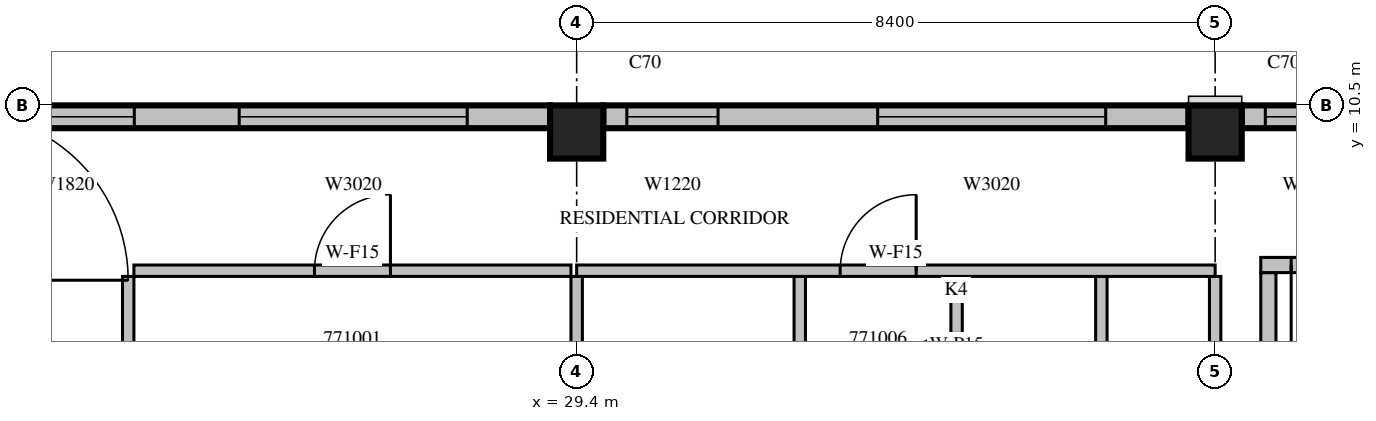
"""IFC4 building model, lengths in metres.
Left out: names, types, materials, properties, quantities, classifications, styles, units other than length and angle.
Written with IfcOpenShell. Run it as: python <this file> out.ifc"""

import sys

from ifc_helpers import new_model, si_unit, direction, frame, frame_2d, origin, origin_2d, place, context, subcontext, project, spatial, rectangle, extrude, source, transform, mapped, element, fill, save


model = new_model("IFC4")
c1 = context("Model", 3, precision=1e-05, world=origin(), true_north=direction((0.0, 1.0)))
c2 = subcontext(c1, "Body", "Model", "MODEL_VIEW")
j1 = project(units=[si_unit("LENGTHUNIT", "METRE"), si_unit("PLANEANGLEUNIT", "RADIAN")], contexts=[c1])
p1 = place(None, origin())
s1 = spatial("IfcSite", under=j1, at=p1, CompositionType="ELEMENT")
p2 = place(p1, origin())
s2 = spatial("IfcBuilding", under=s1, at=p2, CompositionType="ELEMENT")
p3 = place(p2, frame((0.0, 0.0, 309.0)))
s3 = spatial("IfcBuildingStorey", under=s2, at=p3, CompositionType="ELEMENT", Elevation=309.0)
m1 = source(origin(), c2, "Body", "SweptSolid", [
    extrude(rectangle(XDim=0.7, YDim=0.7, at=origin_2d()), origin(), (0.0, 0.0, 1.0), 3.5),
])
for number, where, z_axis, x_axis in (
    (1, (29.4, 10.15, 0.0), (0.0, 0.0, 1.0), (1.0, 0.0, 0.0)),
    (2, (37.8, 10.15, 0.0), (0.0, 0.0, 1.0), (1.0, 0.0, 0.0)),
):
    element("IfcColumn", number, at=place(p3, frame(where, z_axis=z_axis, x_axis=x_axis)), inside=s3, PredefinedType="COLUMN", context=c2, shape_type="MappedRepresentation", body=[
        mapped(m1, transform((0.0, 0.0, 0.0), scale=1.0)),
    ])
m2 = source(origin(), c2, "Body", "SweptSolid", [
    extrude(rectangle(XDim=7.7, YDim=0.3, at=frame_2d((3.85, 0.0))), origin(), (0.0, 0.0, 1.0), 3.1),
])
p4 = place(p3, frame((45.85, 10.35, 0.0), z_axis=(0.0, 0.0, 1.0), x_axis=(-1.0, 0.0, 0.0)))
e3 = element("IfcWall", 3, at=p4, inside=s3, PredefinedType="STANDARD", context=c2, shape_type="MappedRepresentation", body=[
    mapped(m2, transform((0.0, 0.0, 0.0), scale=1.0)),
])
m3 = source(origin(), c2, "Body", "SweptSolid", [
    extrude(rectangle(XDim=3.0, YDim=2.0, at=frame_2d((1.5, 1.0))), frame((0.0, 0.16, 0.0), z_axis=(0.0, -1.0, 0.0), x_axis=(1.0, 0.0, 0.0)), (0.0, 0.0, 1.0), 0.32),
])
p5 = place(p4, frame((1.09, 0.0, 0.6)))
e4 = element("IfcOpeningElement", 4, at=p5, cuts=e3, PredefinedType="OPENING", context=c2, shape_type="MappedRepresentation", body=[
    mapped(m3, transform((0.0, 0.0, 0.0), scale=1.0)),
])
m4 = source(origin(), c2, "Body", "SweptSolid", [
    extrude(rectangle(XDim=1.2, YDim=2.0, at=frame_2d((0.6, 1.0))), frame((0.0, 0.16, 0.0), z_axis=(0.0, -1.0, 0.0), x_axis=(1.0, 0.0, 0.0)), (0.0, 0.0, 1.0), 0.32),
])
p6 = place(p4, frame((6.19, 0.0, 0.6)))
e5 = element("IfcOpeningElement", 5, at=p6, cuts=e3, PredefinedType="OPENING", context=c2, shape_type="MappedRepresentation", body=[
    mapped(m4, transform((0.0, 0.0, 0.0), scale=1.0)),
])
p7 = place(p3, frame((37.45, 10.35, 0.0), z_axis=(0.0, 0.0, 1.0), x_axis=(-1.0, 0.0, 0.0)))
e6 = element("IfcWall", 6, at=p7, inside=s3, PredefinedType="STANDARD", context=c2, shape_type="MappedRepresentation", body=[
    mapped(m2, transform((0.0, 0.0, 0.0), scale=1.0)),
])
p8 = place(p7, frame((1.09, 0.0, 0.6)))
e7 = element("IfcOpeningElement", 7, at=p8, cuts=e6, PredefinedType="OPENING", context=c2, shape_type="MappedRepresentation", body=[
    mapped(m3, transform((0.0, 0.0, 0.0), scale=1.0)),
])
p9 = place(p7, frame((6.19, 0.0, 0.6)))
e8 = element("IfcOpeningElement", 8, at=p9, cuts=e6, PredefinedType="OPENING", context=c2, shape_type="MappedRepresentation", body=[
    mapped(m4, transform((0.0, 0.0, 0.0), scale=1.0)),
])
m5 = source(origin(), c2, "Body", "SweptSolid", [
    extrude(rectangle(XDim=7.45, YDim=0.3, at=frame_2d((3.725, 0.0))), origin(), (0.0, 0.0, 1.0), 3.1),
])
p10 = place(p3, frame((29.05, 10.35, 0.0), z_axis=(0.0, 0.0, 1.0), x_axis=(-1.0, 0.0, 0.0)))
e9 = element("IfcWall", 9, at=p10, inside=s3, PredefinedType="STANDARD", context=c2, shape_type="MappedRepresentation", body=[
    mapped(m5, transform((0.0, 0.0, 0.0), scale=1.0)),
])
p11 = place(p10, frame((1.09, 0.0, 0.6)))
e10 = element("IfcOpeningElement", 10, at=p11, cuts=e9, PredefinedType="OPENING", context=c2, shape_type="MappedRepresentation", body=[
    mapped(m3, transform((0.0, 0.0, 0.0), scale=1.0)),
])
m6 = source(origin(), c2, "Body", "SweptSolid", [
    extrude(rectangle(XDim=1.8, YDim=2.0, at=frame_2d((0.9, 1.0))), frame((0.0, 0.16, 0.0), z_axis=(0.0, -1.0, 0.0), x_axis=(1.0, 0.0, 0.0)), (0.0, 0.0, 1.0), 0.32),
])
p12 = place(p10, frame((5.47, 0.0, 0.6)))
e11 = element("IfcOpeningElement", 11, at=p12, cuts=e9, PredefinedType="OPENING", context=c2, shape_type="MappedRepresentation", body=[
    mapped(m6, transform((0.0, 0.0, 0.0), scale=1.0)),
])
m7 = source(origin(), c2, "Body", "SweptSolid", [
    extrude(rectangle(XDim=8.0, YDim=0.2, at=frame_2d((4.0, 0.0))), origin(), (0.0, 0.0, 1.0), 3.1),
])
p13 = place(p3, frame((38.5, 0.3, 0.0), z_axis=(0.0, 0.0, 1.0), x_axis=(0.0, 1.0, 0.0)))
e12 = element("IfcWall", 12, at=p13, inside=s3, PredefinedType="PARTITIONING", context=c2, shape_type="MappedRepresentation", body=[
    mapped(m7, transform((0.0, 0.0, 0.0), scale=1.0)),
])
m8 = source(origin(), c2, "Body", "SweptSolid", [
    extrude(rectangle(XDim=5.45, YDim=0.2, at=frame_2d((2.725, 0.0))), origin(), (0.0, 0.0, 1.0), 3.1),
])
p14 = place(p3, frame((38.4, 8.4, 0.0), z_axis=(0.0, 0.0, 1.0), x_axis=(1.0, 0.0, 0.0)))
e13 = element("IfcWall", 13, at=p14, inside=s3, PredefinedType="PARTITIONING", context=c2, shape_type="MappedRepresentation", body=[
    mapped(m8, transform((0.0, 0.0, 0.0), scale=1.0)),
])
m9 = source(origin(), c2, "Body", "SweptSolid", [
    extrude(rectangle(XDim=1.2, YDim=2.1, at=frame_2d((0.6, 1.05))), frame((0.0, 0.11, 0.0), z_axis=(0.0, -1.0, 0.0), x_axis=(1.0, 0.0, 0.0)), (0.0, 0.0, 1.0), 0.22),
])
p15 = place(p14, frame((0.4, 0.0, 0.0)))
e14 = element("IfcOpeningElement", 14, at=p15, cuts=e13, PredefinedType="OPENING", context=c2, shape_type="MappedRepresentation", body=[
    mapped(m9, transform((0.0, 0.0, 0.0), scale=1.0)),
])
m10 = source(origin(), c2, "Body", "SweptSolid", [
    extrude(rectangle(XDim=0.9, YDim=2.1, at=frame_2d((0.45, 1.05))), frame((0.0, 0.11, 0.0), z_axis=(0.0, -1.0, 0.0), x_axis=(1.0, 0.0, 0.0)), (0.0, 0.0, 1.0), 0.22),
])
p16 = place(p14, frame((3.25, 0.0, 0.0)))
e15 = element("IfcOpeningElement", 15, at=p16, cuts=e13, PredefinedType="OPENING", context=c2, shape_type="MappedRepresentation", body=[
    mapped(m10, transform((0.0, 0.0, 0.0), scale=1.0)),
])
m11 = source(origin(), c2, "Body", "SweptSolid", [
    extrude(rectangle(XDim=4.575, YDim=0.15, at=frame_2d((2.288, 0.0))), origin(), (0.0, 0.0, 1.0), 3.1),
])
p17 = place(p3, frame((23.5, 8.25, 0.0), z_axis=(0.0, 0.0, 1.0), x_axis=(0.0, -1.0, 0.0)))
e16 = element("IfcWall", 16, at=p17, inside=s3, PredefinedType="PARTITIONING", context=c2, shape_type="MappedRepresentation", body=[
    mapped(m11, transform((0.0, 0.0, 0.0), scale=1.0)),
])
m12 = source(origin(), c2, "Body", "SweptSolid", [
    extrude(rectangle(XDim=0.9, YDim=2.1, at=frame_2d((0.45, 1.05))), frame((0.0, 0.085, 0.0), z_axis=(0.0, -1.0, 0.0), x_axis=(1.0, 0.0, 0.0)), (0.0, 0.0, 1.0), 0.17),
])
p18 = place(p17, frame((2.981, 0.0, 0.0)))
e17 = element("IfcOpeningElement", 17, at=p18, cuts=e16, PredefinedType="OPENING", context=c2, shape_type="MappedRepresentation", body=[
    mapped(m12, transform((0.0, 0.0, 0.0), scale=1.0)),
])
p19 = place(p3, frame((29.4, 3.675, 0.0), z_axis=(0.0, 0.0, 1.0), x_axis=(0.0, 1.0, 0.0)))
e18 = element("IfcWall", 18, at=p19, inside=s3, PredefinedType="PARTITIONING", context=c2, shape_type="MappedRepresentation", body=[
    mapped(m11, transform((0.0, 0.0, 0.0), scale=1.0)),
])
m13 = source(origin(), c2, "Body", "SweptSolid", [
    extrude(rectangle(XDim=5.75, YDim=0.15, at=frame_2d((2.875, 0.0))), origin(), (0.0, 0.0, 1.0), 3.1),
])
p20 = place(p3, frame((29.325, 8.325, 0.0), z_axis=(0.0, 0.0, 1.0), x_axis=(-1.0, 0.0, 0.0)))
e19 = element("IfcWall", 19, at=p20, inside=s3, PredefinedType="PARTITIONING", context=c2, shape_type="MappedRepresentation", body=[
    mapped(m13, transform((0.0, 0.0, 0.0), scale=1.0)),
])
m14 = source(origin(), c2, "Body", "SweptSolid", [
    extrude(rectangle(XDim=1.0, YDim=2.1, at=frame_2d((0.5, 1.05))), frame((0.0, 0.085, 0.0), z_axis=(0.0, -1.0, 0.0), x_axis=(1.0, 0.0, 0.0)), (0.0, 0.0, 1.0), 0.17),
])
p21 = place(p20, frame((2.375, 0.0, 0.0)))
e20 = element("IfcOpeningElement", 20, at=p21, cuts=e19, PredefinedType="OPENING", context=c2, shape_type="MappedRepresentation", body=[
    mapped(m14, transform((0.0, 0.0, 0.0), scale=1.0)),
])
m15 = source(origin(), c2, "Body", "SweptSolid", [
    extrude(rectangle(XDim=2.4, YDim=0.15, at=frame_2d((1.2, 0.0))), origin(), (0.0, 0.0, 1.0), 3.1),
])
p22 = place(p3, frame((32.335, 5.85, 0.0), z_axis=(0.0, 0.0, 1.0), x_axis=(0.0, 1.0, 0.0)))
e21 = element("IfcWall", 21, at=p22, inside=s3, PredefinedType="PARTITIONING", context=c2, shape_type="MappedRepresentation", body=[
    mapped(m15, transform((0.0, 0.0, 0.0), scale=1.0)),
])
p23 = place(p3, frame((34.398, 5.85, 0.0), z_axis=(0.0, 0.0, 1.0), x_axis=(0.0, 1.0, 0.0)))
e22 = element("IfcWall", 22, at=p23, inside=s3, PredefinedType="PARTITIONING", context=c2, shape_type="MappedRepresentation", body=[
    mapped(m15, transform((0.0, 0.0, 0.0), scale=1.0)),
])
p24 = place(p23, frame((0.75, 0.0, 0.0)))
e23 = element("IfcOpeningElement", 23, at=p24, cuts=e22, PredefinedType="OPENING", context=c2, shape_type="MappedRepresentation", body=[
    mapped(m12, transform((0.0, 0.0, 0.0), scale=1.0)),
])
for number, where, z_axis, x_axis in (
    (24, (36.303, 5.85, 0.0), (0.0, 0.0, 1.0), (0.0, 1.0, 0.0)),
    (25, (37.8, 5.85, 0.0), (0.0, 0.0, 1.0), (0.0, 1.0, 0.0)),
):
    element("IfcWall", number, at=place(p3, frame(where, z_axis=z_axis, x_axis=x_axis)), inside=s3, PredefinedType="PARTITIONING", context=c2, shape_type="MappedRepresentation", body=[
        mapped(m15, transform((0.0, 0.0, 0.0), scale=1.0)),
    ])
m16 = source(origin(), c2, "Body", "SweptSolid", [
    extrude(rectangle(XDim=8.4, YDim=0.15, at=frame_2d((4.2, 0.0))), origin(), (0.0, 0.0, 1.0), 3.1),
])
p25 = place(p3, frame((37.8, 8.325, 0.0), z_axis=(0.0, 0.0, 1.0), x_axis=(-1.0, 0.0, 0.0)))
e26 = element("IfcWall", 26, at=p25, inside=s3, PredefinedType="PARTITIONING", context=c2, shape_type="MappedRepresentation", body=[
    mapped(m16, transform((0.0, 0.0, 0.0), scale=1.0)),
])
p26 = place(p25, frame((3.933, 0.0, 0.0)))
e27 = element("IfcOpeningElement", 27, at=p26, cuts=e26, PredefinedType="OPENING", context=c2, shape_type="MappedRepresentation", body=[
    mapped(m14, transform((0.0, 0.0, 0.0), scale=1.0)),
])
m17 = source(origin(), c2, "Body", "SweptSolid", [
    extrude(rectangle(XDim=1.2, YDim=2.0, at=frame_2d((0.6, 1.0))), frame((0.0, 0.03, 0.0), z_axis=(0.0, -1.0, 0.0), x_axis=(1.0, 0.0, 0.0)), (0.0, 0.0, 1.0), 0.06),
])
p27 = place(p6, origin())
e28 = element("IfcWindow", 28, at=p27, inside=s3, PartitioningType="SINGLE_PANEL", PredefinedType="WINDOW", context=c2, shape_type="MappedRepresentation", body=[
    mapped(m17, transform((0.0, 0.0, 0.0), scale=1.0)),
])
fill(e5, e28)
m18 = source(origin(), c2, "Body", "SweptSolid", [
    extrude(rectangle(XDim=3.0, YDim=2.0, at=frame_2d((1.5, 1.0))), frame((0.0, 0.03, 0.0), z_axis=(0.0, -1.0, 0.0), x_axis=(1.0, 0.0, 0.0)), (0.0, 0.0, 1.0), 0.06),
])
p28 = place(p8, origin())
e29 = element("IfcWindow", 29, at=p28, inside=s3, PartitioningType="SINGLE_PANEL", PredefinedType="WINDOW", context=c2, shape_type="MappedRepresentation", body=[
    mapped(m18, transform((0.0, 0.0, 0.0), scale=1.0)),
])
fill(e7, e29)
p29 = place(p9, origin())
e30 = element("IfcWindow", 30, at=p29, inside=s3, PartitioningType="SINGLE_PANEL", PredefinedType="WINDOW", context=c2, shape_type="MappedRepresentation", body=[
    mapped(m17, transform((0.0, 0.0, 0.0), scale=1.0)),
])
fill(e8, e30)
p30 = place(p11, origin())
e31 = element("IfcWindow", 31, at=p30, inside=s3, PartitioningType="SINGLE_PANEL", PredefinedType="WINDOW", context=c2, shape_type="MappedRepresentation", body=[
    mapped(m18, transform((0.0, 0.0, 0.0), scale=1.0)),
])
fill(e10, e31)
m19 = source(origin(), c2, "Body", "SweptSolid", [
    extrude(rectangle(XDim=1.8, YDim=2.0, at=frame_2d((0.9, 1.0))), frame((0.0, 0.03, 0.0), z_axis=(0.0, -1.0, 0.0), x_axis=(1.0, 0.0, 0.0)), (0.0, 0.0, 1.0), 0.06),
])
p31 = place(p12, origin())
e32 = element("IfcWindow", 32, at=p31, inside=s3, PartitioningType="SINGLE_PANEL", PredefinedType="WINDOW", context=c2, shape_type="MappedRepresentation", body=[
    mapped(m19, transform((0.0, 0.0, 0.0), scale=1.0)),
])
fill(e11, e32)
m20 = source(origin(), c2, "Body", "SweptSolid", [
    extrude(rectangle(XDim=1.2, YDim=2.1, at=frame_2d((0.6, 1.05))), frame((0.0, 0.025, 0.0), z_axis=(0.0, -1.0, 0.0), x_axis=(1.0, 0.0, 0.0)), (0.0, 0.0, 1.0), 0.05),
])
p32 = place(p15, origin())
e33 = element("IfcDoor", 33, at=p32, inside=s3, OperationType="SINGLE_SWING_RIGHT", PredefinedType="DOOR", context=c2, shape_type="MappedRepresentation", body=[
    mapped(m20, transform((0.0, 0.0, 0.0), scale=1.0)),
])
fill(e14, e33)
m21 = source(origin(), c2, "Body", "SweptSolid", [
    extrude(rectangle(XDim=1.0, YDim=2.1, at=frame_2d((0.5, 1.05))), frame((0.0, 0.025, 0.0), z_axis=(0.0, -1.0, 0.0), x_axis=(1.0, 0.0, 0.0)), (0.0, 0.0, 1.0), 0.05),
])
p33 = place(p21, origin())
e34 = element("IfcDoor", 34, at=p33, inside=s3, OperationType="SINGLE_SWING_RIGHT", PredefinedType="DOOR", context=c2, shape_type="MappedRepresentation", body=[
    mapped(m21, transform((0.0, 0.0, 0.0), scale=1.0)),
])
fill(e20, e34)
p34 = place(p26, origin())
e35 = element("IfcDoor", 35, at=p34, inside=s3, OperationType="SINGLE_SWING_RIGHT", PredefinedType="DOOR", context=c2, shape_type="MappedRepresentation", body=[
    mapped(m21, transform((0.0, 0.0, 0.0), scale=1.0)),
])
fill(e27, e35)
m22 = source(origin(), c2, "Body", "SweptSolid", [
    extrude(rectangle(XDim=0.9, YDim=2.1, at=frame_2d((0.45, 1.05))), frame((0.0, 0.025, 0.0), z_axis=(0.0, -1.0, 0.0), x_axis=(1.0, 0.0, 0.0)), (0.0, 0.0, 1.0), 0.05),
])
p35 = place(p24, origin())
e36 = element("IfcDoor", 36, at=p35, inside=s3, OperationType="SINGLE_SWING_LEFT", PredefinedType="DOOR", context=c2, shape_type="MappedRepresentation", body=[
    mapped(m22, transform((0.0, 0.0, 0.0), scale=1.0)),
])
fill(e23, e36)
save(model, sys.argv[1])
